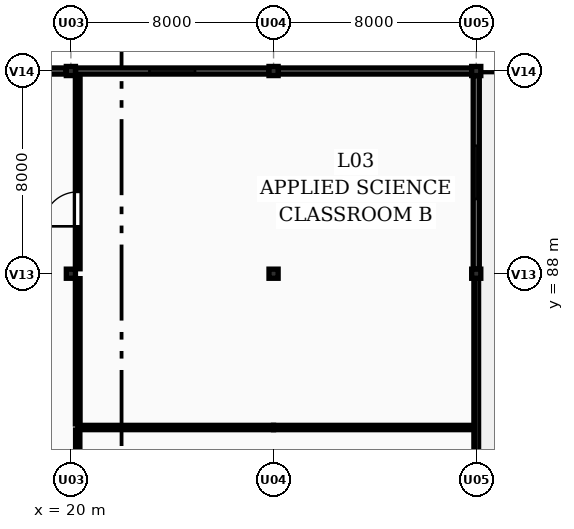
"""IFC4 building model, lengths in metres.
Left out: names, types, materials, properties, quantities, classifications, styles, units other than length and angle.
Written with IfcOpenShell. Run it as: python <this file> out.ifc"""

import sys

from ifc_helpers import new_model, si_unit, direction, frame, frame_2d, origin, origin_2d, place, context, subcontext, project, spatial, rectangle, extrude, element, fill, save


model = new_model("IFC4")
c1 = context("Model", 3, precision=1e-05, world=origin(), true_north=direction((0.0, 1.0)))
c2 = subcontext(c1, "Body", "Model", "MODEL_VIEW")
j1 = project(units=[si_unit("LENGTHUNIT", "METRE"), si_unit("PLANEANGLEUNIT", "RADIAN")], contexts=[c1])
p1 = place(None, origin())
s1 = spatial("IfcSite", under=j1, at=p1, CompositionType="ELEMENT")
p2 = place(p1, origin())
s2 = spatial("IfcBuilding", under=s1, at=p2, CompositionType="ELEMENT")
p3 = place(p2, frame((0.0, 0.0, 12.3)))
s3 = spatial("IfcBuildingStorey", under=s2, at=p3, CompositionType="ELEMENT", Elevation=12.3)
p4 = place(p3, frame((20.0, 88.0, 0.0), z_axis=(0.0, 0.0, 1.0), x_axis=(1.0, 0.0, 0.0)))
e1 = element("IfcColumn", 1, at=p4, inside=s3, PredefinedType="COLUMN", context=c2, shape_type="SweptSolid", body=[
    extrude(rectangle(XDim=0.36, YDim=0.36, at=origin_2d()), origin(), (0.0, 0.0, 1.0), 5.477),
])
p5 = place(p3, frame((20.0, 96.0, 0.0), z_axis=(0.0, 0.0, 1.0), x_axis=(1.0, 0.0, 0.0)))
e2 = element("IfcColumn", 2, at=p5, inside=s3, PredefinedType="COLUMN", context=c2, shape_type="SweptSolid", body=[
    extrude(rectangle(XDim=0.36, YDim=0.36, at=origin_2d()), origin(), (0.0, 0.0, 1.0), 6.026),
])
p6 = place(p3, frame((28.0, 88.0, 0.0), z_axis=(0.0, 0.0, 1.0), x_axis=(1.0, 0.0, 0.0)))
e3 = element("IfcColumn", 3, at=p6, inside=s3, PredefinedType="COLUMN", context=c2, shape_type="SweptSolid", body=[
    extrude(rectangle(XDim=0.36, YDim=0.36, at=origin_2d()), origin(), (0.0, 0.0, 1.0), 5.136),
])
p7 = place(p3, frame((28.0, 96.0, 0.0), z_axis=(0.0, 0.0, 1.0), x_axis=(1.0, 0.0, 0.0)))
e4 = element("IfcColumn", 4, at=p7, inside=s3, PredefinedType="COLUMN", context=c2, shape_type="SweptSolid", body=[
    extrude(rectangle(XDim=0.36, YDim=0.36, at=origin_2d()), origin(), (0.0, 0.0, 1.0), 5.685),
])
p8 = place(p3, frame((36.0, 88.0, 0.0), z_axis=(0.0, 0.0, 1.0), x_axis=(1.0, 0.0, 0.0)))
e5 = element("IfcColumn", 5, at=p8, inside=s3, PredefinedType="COLUMN", context=c2, shape_type="SweptSolid", body=[
    extrude(rectangle(XDim=0.36, YDim=0.36, at=origin_2d()), origin(), (0.0, 0.0, 1.0), 4.795),
])
p9 = place(p3, frame((36.0, 96.0, 0.0), z_axis=(0.0, 0.0, 1.0), x_axis=(1.0, 0.0, 0.0)))
e6 = element("IfcColumn", 6, at=p9, inside=s3, PredefinedType="COLUMN", context=c2, shape_type="SweptSolid", body=[
    extrude(rectangle(XDim=0.36, YDim=0.36, at=origin_2d()), origin(), (0.0, 0.0, 1.0), 5.344),
])
p10 = place(p3, frame((12.18, 96.0, 0.0), z_axis=(0.0, 0.0, 1.0), x_axis=(1.0, 0.0, 0.0)))
e7 = element("IfcWall", 7, at=p10, inside=s3, PredefinedType="SOLIDWALL", context=c2, shape_type="SweptSolid", body=[
    extrude(rectangle(XDim=7.64, YDim=0.24, at=frame_2d((3.82, 0.0))), origin(), (0.0, 0.0, 1.0), 5.444),
])
p11 = place(p10, frame((2.62, 0.0, 0.95)))
e8 = element("IfcOpeningElement", 8, at=p11, cuts=e7, PredefinedType="OPENING", context=c2, shape_type="SweptSolid", body=[
    extrude(rectangle(XDim=1.5, YDim=1.35, at=frame_2d((0.75, 0.675))), frame((0.0, 0.13, 0.0), z_axis=(0.0, -1.0, 0.0), x_axis=(1.0, 0.0, 0.0)), (0.0, 0.0, 1.0), 0.26),
])
p12 = place(p3, frame((20.18, 96.0, 0.0), z_axis=(0.0, 0.0, 1.0), x_axis=(1.0, 0.0, 0.0)))
e9 = element("IfcWall", 9, at=p12, inside=s3, PredefinedType="SOLIDWALL", context=c2, shape_type="SweptSolid", body=[
    extrude(rectangle(XDim=7.64, YDim=0.24, at=frame_2d((3.82, 0.0))), origin(), (0.0, 0.0, 1.0), 5.103),
])
p13 = place(p12, frame((2.92, 0.0, 0.95)))
e10 = element("IfcOpeningElement", 10, at=p13, cuts=e9, PredefinedType="OPENING", context=c2, shape_type="SweptSolid", body=[
    extrude(rectangle(XDim=1.8, YDim=1.35, at=frame_2d((0.9, 0.675))), frame((0.0, 0.13, 0.0), z_axis=(0.0, -1.0, 0.0), x_axis=(1.0, 0.0, 0.0)), (0.0, 0.0, 1.0), 0.26),
])
p14 = place(p3, frame((28.18, 96.0, 0.0), z_axis=(0.0, 0.0, 1.0), x_axis=(1.0, 0.0, 0.0)))
e11 = element("IfcWall", 11, at=p14, inside=s3, PredefinedType="SOLIDWALL", context=c2, shape_type="SweptSolid", body=[
    extrude(rectangle(XDim=7.64, YDim=0.24, at=frame_2d((3.82, 0.0))), origin(), (0.0, 0.0, 1.0), 4.761),
])
p15 = place(p3, frame((36.0, 95.82, 0.0), z_axis=(0.0, 0.0, 1.0), x_axis=(0.0, -1.0, 0.0)))
e12 = element("IfcWall", 12, at=p15, inside=s3, PredefinedType="SOLIDWALL", context=c2, shape_type="SweptSolid", body=[
    extrude(rectangle(XDim=7.64, YDim=0.24, at=frame_2d((3.82, 0.0))), origin(), (0.0, 0.0, 1.0), 4.217),
])
p16 = place(p15, frame((2.77, 0.0, 0.95)))
e13 = element("IfcOpeningElement", 13, at=p16, cuts=e12, PredefinedType="OPENING", context=c2, shape_type="SweptSolid", body=[
    extrude(rectangle(XDim=2.1, YDim=1.35, at=frame_2d((1.05, 0.675))), frame((0.0, 0.13, 0.0), z_axis=(0.0, -1.0, 0.0), x_axis=(1.0, 0.0, 0.0)), (0.0, 0.0, 1.0), 0.26),
])
p17 = place(p3, frame((36.0, 87.82, 0.0), z_axis=(0.0, 0.0, 1.0), x_axis=(0.0, -1.0, 0.0)))
e14 = element("IfcWall", 14, at=p17, inside=s3, PredefinedType="SOLIDWALL", context=c2, shape_type="SweptSolid", body=[
    extrude(rectangle(XDim=7.64, YDim=0.185, at=frame_2d((3.82, 0.0))), origin(), (0.0, 0.0, 1.0), 0.95),
])
p18 = place(p3, frame((20.27, 81.93, 0.0), z_axis=(0.0, 0.0, 1.0), x_axis=(1.0, 0.0, 0.0)))
e15 = element("IfcWall", 15, at=p18, inside=s3, PredefinedType="PARTITIONING", context=c2, shape_type="SweptSolid", body=[
    extrude(rectangle(XDim=7.73, YDim=0.17, at=frame_2d((3.865, 0.0))), origin(), (0.0, 0.0, 1.0), 3.65),
])
p19 = place(p3, frame((28.0, 81.93, 0.0), z_axis=(0.0, 0.0, 1.0), x_axis=(1.0, 0.0, 0.0)))
e16 = element("IfcWall", 16, at=p19, inside=s3, PredefinedType="PARTITIONING", context=c2, shape_type="SweptSolid", body=[
    extrude(rectangle(XDim=7.865, YDim=0.17, at=frame_2d((3.933, 0.0))), origin(), (0.0, 0.0, 1.0), 3.65),
])
p20 = place(p3, frame((20.27, 80.195, 0.0), z_axis=(0.0, 0.0, 1.0), x_axis=(0.0, 1.0, 0.0)))
e17 = element("IfcWall", 17, at=p20, inside=s3, PredefinedType="PARTITIONING", context=c2, shape_type="SweptSolid", body=[
    extrude(rectangle(XDim=1.635, YDim=0.17, at=frame_2d((0.817, 0.0))), origin(), (0.0, 0.0, 1.0), 3.65),
])
p21 = place(p3, frame((20.27, 82.07, 0.0), z_axis=(0.0, 0.0, 1.0), x_axis=(0.0, 1.0, 0.0)))
e18 = element("IfcWall", 18, at=p21, inside=s3, PredefinedType="PARTITIONING", context=c2, shape_type="SweptSolid", body=[
    extrude(rectangle(XDim=5.735, YDim=0.185, at=frame_2d((2.867, 0.0))), origin(), (0.0, 0.0, 1.0), 3.65),
])
p22 = place(p3, frame((20.27, 88.195, 0.0), z_axis=(0.0, 0.0, 1.0), x_axis=(0.0, 1.0, 0.0)))
e19 = element("IfcWall", 19, at=p22, inside=s3, PredefinedType="PARTITIONING", context=c2, shape_type="SweptSolid", body=[
    extrude(rectangle(XDim=7.643, YDim=0.185, at=frame_2d((3.821, 0.0))), origin(), (0.0, 0.0, 1.0), 3.65),
])
p23 = place(p22, frame((1.675, 0.0, 0.0)))
e20 = element("IfcOpeningElement", 20, at=p23, cuts=e19, PredefinedType="OPENING", context=c2, shape_type="SweptSolid", body=[
    extrude(rectangle(XDim=1.36, YDim=2.15, at=frame_2d((0.68, 1.075))), frame((0.0, 0.103, 0.0), z_axis=(0.0, -1.0, 0.0), x_axis=(1.0, 0.0, 0.0)), (0.0, 0.0, 1.0), 0.205),
])
p24 = place(p13, origin())
e21 = element("IfcWindow", 21, at=p24, inside=s3, PartitioningType="DOUBLE_PANEL_VERTICAL", PredefinedType="WINDOW", context=c2, shape_type="SweptSolid", body=[
    extrude(rectangle(XDim=1.8, YDim=1.35, at=frame_2d((0.9, 0.675))), frame((0.0, 0.03, 0.0), z_axis=(0.0, -1.0, 0.0), x_axis=(1.0, 0.0, 0.0)), (0.0, 0.0, 1.0), 0.06),
])
fill(e10, e21)
p25 = place(p16, origin())
e22 = element("IfcWindow", 22, at=p25, inside=s3, PartitioningType="DOUBLE_PANEL_VERTICAL", PredefinedType="WINDOW", context=c2, shape_type="SweptSolid", body=[
    extrude(rectangle(XDim=2.1, YDim=1.35, at=frame_2d((1.05, 0.675))), frame((0.0, 0.03, 0.0), z_axis=(0.0, -1.0, 0.0), x_axis=(1.0, 0.0, 0.0)), (0.0, 0.0, 1.0), 0.06),
])
fill(e13, e22)
p26 = place(p23, origin())
e23 = element("IfcDoor", 23, at=p26, inside=s3, OperationType="SINGLE_SWING_LEFT", PredefinedType="DOOR", context=c2, shape_type="SweptSolid", body=[
    extrude(rectangle(XDim=1.36, YDim=2.15, at=frame_2d((0.68, 1.075))), frame((0.0, 0.025, 0.0), z_axis=(0.0, -1.0, 0.0), x_axis=(1.0, 0.0, 0.0)), (0.0, 0.0, 1.0), 0.05),
])
fill(e20, e23)
save(model, sys.argv[1])
